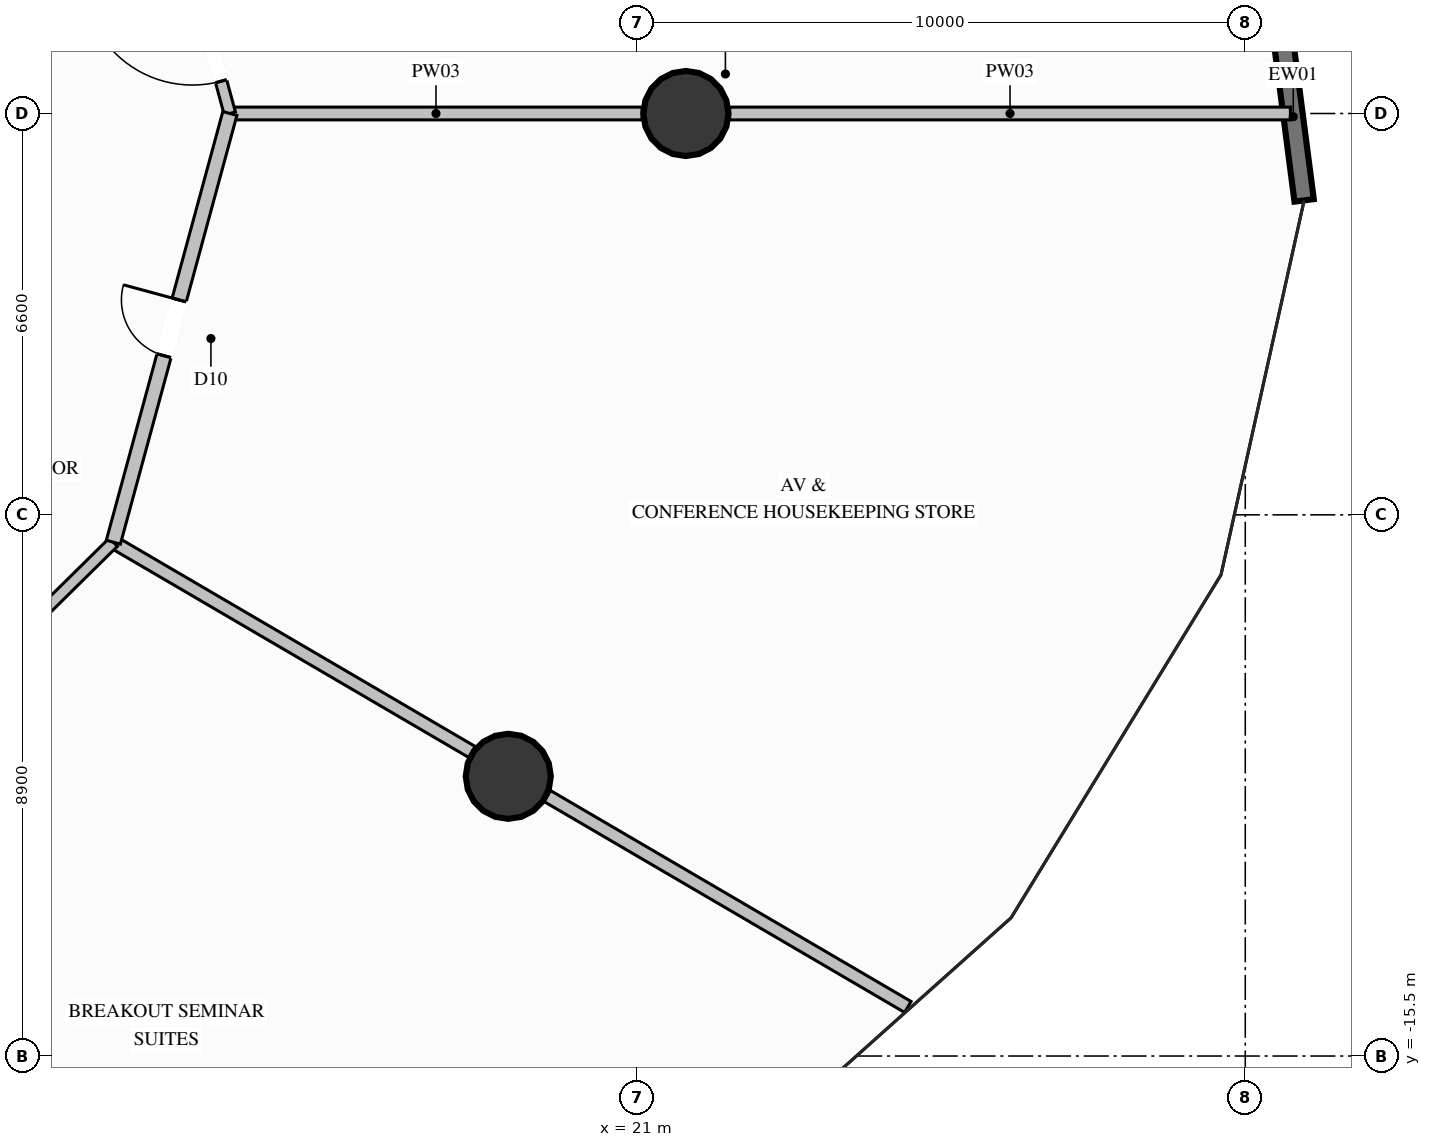
"""IFC4 building model, lengths in metres.
Left out: names, types, materials, properties, quantities, classifications, styles, units other than length and angle.
Written with IfcOpenShell. Run it as: python <this file> out.ifc"""

import sys

from ifc_helpers import new_model, si_unit, direction, frame, frame_2d, origin, origin_2d, place, context, subcontext, project, spatial, rectangle, circle, extrude, element, fill, save


model = new_model("IFC4")
c1 = context("Model", 3, precision=1e-05, world=origin(), true_north=direction((0.0, 1.0)))
c2 = subcontext(c1, "Body", "Model", "MODEL_VIEW")
j1 = project(units=[si_unit("LENGTHUNIT", "METRE"), si_unit("PLANEANGLEUNIT", "RADIAN")], contexts=[c1])
p1 = place(None, origin())
s1 = spatial("IfcSite", under=j1, at=p1, CompositionType="ELEMENT")
p2 = place(p1, origin())
s2 = spatial("IfcBuilding", under=s1, at=p2, CompositionType="ELEMENT")
p3 = place(p2, frame((0.0, 0.0, 18.6)))
s3 = spatial("IfcBuildingStorey", under=s2, at=p3, CompositionType="ELEMENT", Elevation=18.6)
for number, where, z_axis, x_axis in (
    (1, (21.8, 0.0, 0.0), (0.0, 0.0, 1.0), (1.0, 0.0, 0.0)),
    (2, (18.879, -10.9, 0.0), (0.0, 0.0, 1.0), (1.0, 0.0, 0.0)),
):
    element("IfcColumn", number, at=place(p3, frame(where, z_axis=z_axis, x_axis=x_axis)), inside=s3, PredefinedType="COLUMN", context=c2, shape_type="SweptSolid", body=[
        extrude(circle(Radius=0.7, at=origin_2d()), origin(), (0.0, 0.0, 1.0), 5.0),
    ])
p4 = place(p3, frame((31.156, 4.825, 0.0), z_axis=(0.0, 0.0, 1.0), x_axis=(0.128759904048, -0.99167579738, 0.0)))
e3 = element("IfcWall", 3, at=p4, inside=s3, PredefinedType="SOLIDWALL", context=c2, shape_type="SweptSolid", body=[
    extrude(rectangle(XDim=6.306, YDim=0.32, at=frame_2d((3.153, 0.0))), origin(), (0.0, 0.0, 1.0), 4.64),
])
p5 = place(p4, frame((1.48, 0.0, 0.65)))
e4 = element("IfcOpeningElement", 4, at=p5, cuts=e3, PredefinedType="OPENING", context=c2, shape_type="SweptSolid", body=[
    extrude(rectangle(XDim=1.8, YDim=2.6, at=frame_2d((0.9, 1.3))), frame((0.0, 0.17, 0.0), z_axis=(0.0, -1.0, 0.0), x_axis=(1.0, 0.0, 0.0)), (0.0, 0.0, 1.0), 0.34),
])
p6 = place(p3, frame((14.3, 0.0, 0.0), z_axis=(0.0, 0.0, 1.0), x_axis=(1.0, 0.0, 0.0)))
e5 = element("IfcWall", 5, at=p6, inside=s3, PredefinedType="PARTITIONING", context=c2, shape_type="SweptSolid", body=[
    extrude(rectangle(XDim=6.78, YDim=0.21, at=frame_2d((3.39, 0.0))), origin(), (0.0, 0.0, 1.0), 3.929),
])
p7 = place(p3, frame((22.52, 0.0, 0.0), z_axis=(0.0, 0.0, 1.0), x_axis=(1.0, 0.0, 0.0)))
e6 = element("IfcWall", 6, at=p7, inside=s3, PredefinedType="PARTITIONING", context=c2, shape_type="SweptSolid", body=[
    extrude(rectangle(XDim=9.222, YDim=0.21, at=frame_2d((4.611, 0.0))), origin(), (0.0, 0.0, 1.0), 4.64),
])
p8 = place(p3, frame((12.384, -7.05, 0.0), z_axis=(0.0, 0.0, 1.0), x_axis=(0.863200238908, -0.504861711313, 0.0)))
e7 = element("IfcWall", 7, at=p8, inside=s3, PredefinedType="PARTITIONING", context=c2, shape_type="SweptSolid", body=[
    extrude(rectangle(XDim=6.832, YDim=0.21, at=frame_2d((3.416, 0.0))), origin(), (0.0, 0.0, 1.0), 3.929),
])
p9 = place(p3, frame((19.521, -11.225, 0.0), z_axis=(0.0, 0.0, 1.0), x_axis=(0.863178834924, -0.504898305542, 0.0)))
e8 = element("IfcWall", 8, at=p9, inside=s3, PredefinedType="PARTITIONING", context=c2, shape_type="SweptSolid", body=[
    extrude(rectangle(XDim=6.869, YDim=0.21, at=frame_2d((3.434, 0.0))), origin(), (0.0, 0.0, 1.0), 4.64),
])
p10 = place(p3, frame((14.3, 0.0, 0.0), z_axis=(0.0, 0.0, 1.0), x_axis=(-0.262260528785, 0.964997106235, 0.0)))
e9 = element("IfcWall", 9, at=p10, inside=s3, PredefinedType="PARTITIONING", context=c2, shape_type="SweptSolid", body=[
    extrude(rectangle(XDim=7.306, YDim=0.19, at=frame_2d((3.653, 0.0))), origin(), (0.0, 0.0, 1.0), 4.219),
])
p11 = place(p10, frame((0.55, 0.0, 0.0)))
e10 = element("IfcOpeningElement", 10, at=p11, cuts=e9, PredefinedType="OPENING", context=c2, shape_type="SweptSolid", body=[
    extrude(rectangle(XDim=1.8, YDim=2.4, at=frame_2d((0.9, 1.2))), frame((0.0, 0.105, 0.0), z_axis=(0.0, -1.0, 0.0), x_axis=(1.0, 0.0, 0.0)), (0.0, 0.0, 1.0), 0.21),
])
p12 = place(p10, frame((4.756, 0.0, 0.9)))
e11 = element("IfcOpeningElement", 11, at=p12, cuts=e9, PredefinedType="OPENING", context=c2, shape_type="SweptSolid", body=[
    extrude(rectangle(XDim=2.0, YDim=1.6, at=frame_2d((1.0, 0.8))), frame((0.0, 0.105, 0.0), z_axis=(0.0, -1.0, 0.0), x_axis=(1.0, 0.0, 0.0)), (0.0, 0.0, 1.0), 0.21),
])
p13 = place(p3, frame((7.15, -12.211, 0.0), z_axis=(0.0, 0.0, 1.0), x_axis=(0.712071304345, 0.702107155303, 0.0)))
e12 = element("IfcWall", 12, at=p13, inside=s3, PredefinedType="PARTITIONING", context=c2, shape_type="SweptSolid", body=[
    extrude(rectangle(XDim=7.351, YDim=0.19, at=frame_2d((3.675, 0.0))), origin(), (0.0, 0.0, 1.0), 4.64),
])
p14 = place(p3, frame((12.384, -7.05, 0.0), z_axis=(0.0, 0.0, 1.0), x_axis=(0.262260528785, 0.964997106235, 0.0)))
e13 = element("IfcWall", 13, at=p14, inside=s3, PredefinedType="PARTITIONING", context=c2, shape_type="SweptSolid", body=[
    extrude(rectangle(XDim=7.306, YDim=0.24, at=frame_2d((3.653, 0.0))), origin(), (0.0, 0.0, 1.0), 4.219),
])
p15 = place(p14, frame((3.178, 0.0, 0.0)))
e14 = element("IfcOpeningElement", 14, at=p15, cuts=e13, PredefinedType="OPENING", context=c2, shape_type="SweptSolid", body=[
    extrude(rectangle(XDim=0.95, YDim=2.1, at=frame_2d((0.475, 1.05))), frame((0.0, 0.13, 0.0), z_axis=(0.0, -1.0, 0.0), x_axis=(1.0, 0.0, 0.0)), (0.0, 0.0, 1.0), 0.26),
])
p16 = place(p11, origin())
e15 = element("IfcDoor", 15, at=p16, inside=s3, OperationType="SINGLE_SWING_RIGHT", PredefinedType="DOOR", context=c2, shape_type="SweptSolid", body=[
    extrude(rectangle(XDim=1.8, YDim=2.4, at=frame_2d((0.9, 1.2))), frame((0.0, 0.025, 0.0), z_axis=(0.0, -1.0, 0.0), x_axis=(1.0, 0.0, 0.0)), (0.0, 0.0, 1.0), 0.05),
])
fill(e10, e15)
p17 = place(p15, origin())
e16 = element("IfcDoor", 16, at=p17, inside=s3, OperationType="SINGLE_SWING_RIGHT", PredefinedType="DOOR", context=c2, shape_type="SweptSolid", body=[
    extrude(rectangle(XDim=0.95, YDim=2.1, at=frame_2d((0.475, 1.05))), frame((0.0, 0.025, 0.0), z_axis=(0.0, -1.0, 0.0), x_axis=(1.0, 0.0, 0.0)), (0.0, 0.0, 1.0), 0.05),
])
fill(e14, e16)
save(model, sys.argv[1])
